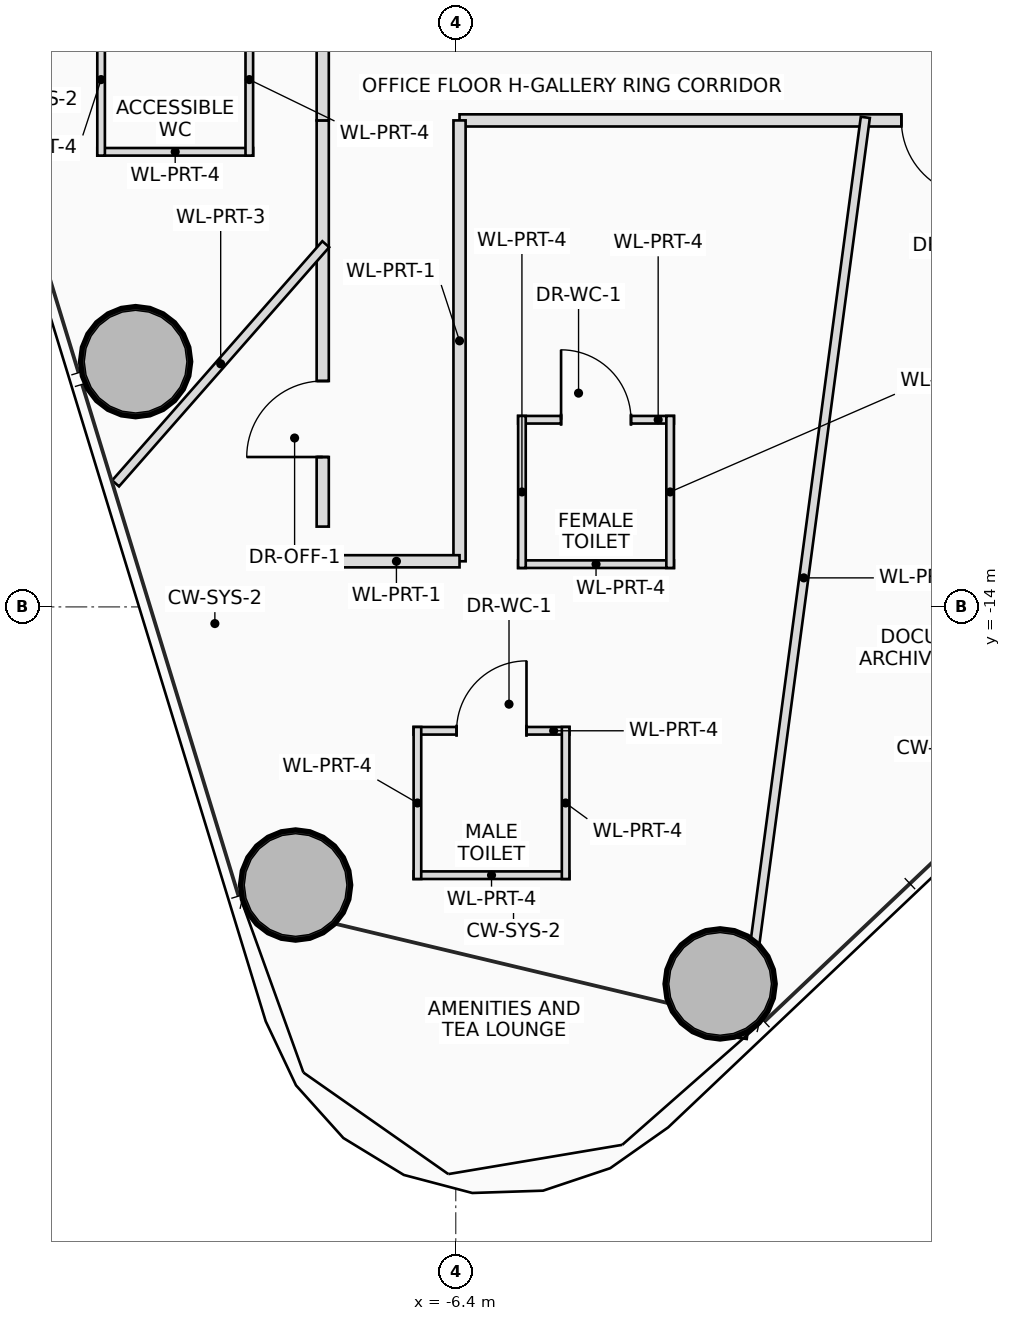
"""IFC4 building model, lengths in metres.
Left out: names, types, materials, properties, quantities, classifications, styles, units other than length and angle.
Written with IfcOpenShell. Run it as: python <this file> out.ifc"""

import sys

from ifc_helpers import new_model, si_unit, direction, frame, frame_2d, origin, origin_2d, place, context, subcontext, project, spatial, rectangle, hollow_circle, extrude, source, transform, mapped, element, fill, save


model = new_model("IFC4")
c1 = context("Model", 3, precision=1e-05, world=origin(), true_north=direction((0.0, 1.0)))
c2 = subcontext(c1, "Body", "Model", "MODEL_VIEW")
j1 = project(units=[si_unit("LENGTHUNIT", "METRE"), si_unit("PLANEANGLEUNIT", "RADIAN")], contexts=[c1])
p1 = place(None, origin())
s1 = spatial("IfcSite", under=j1, at=p1, CompositionType="ELEMENT")
p2 = place(p1, origin())
s2 = spatial("IfcBuilding", under=s1, at=p2, CompositionType="ELEMENT")
p3 = place(p2, frame((0.0, 0.0, 116.15)))
s3 = spatial("IfcBuildingStorey", under=s2, at=p3, CompositionType="ELEMENT", Elevation=116.15)
m1 = source(origin(), c2, "Body", "SweptSolid", [
    extrude(hollow_circle(Radius=0.725, WallThickness=0.05, at=origin_2d()), origin(), (0.0, 0.0, 1.0), 3.75),
])
for number, where, z_axis, x_axis in (
    (1, (-2.921, -18.96, 0.0), (0.0, 0.0, 1.0), (1.0, 0.0, 0.0)),
    (2, (-10.612, -10.774, 0.0), (0.0, 0.0, 1.0), (1.0, 0.0, 0.0)),
    (3, (-8.507, -17.659, 0.0), (0.0, 0.0, 1.0), (1.0, 0.0, 0.0)),
):
    element("IfcColumn", number, at=place(p3, frame(where, z_axis=z_axis, x_axis=x_axis)), inside=s3, PredefinedType="COLUMN", context=c2, shape_type="MappedRepresentation", body=[
        mapped(m1, transform((0.0, 0.0, 0.0), scale=1.0)),
    ])
p4 = place(p3, frame((-6.954, -15.63, 0.0), z_axis=(0.0, 0.0, 1.0), x_axis=(1.0, 0.0, 0.0)))
e4 = element("IfcWall", 4, at=p4, inside=s3, PredefinedType="PARTITIONING", context=c2, shape_type="SweptSolid", body=[
    extrude(rectangle(XDim=2.05, YDim=0.1, at=frame_2d((1.025, 0.0))), origin(), (0.0, 0.0, 1.0), 3.51),
])
p5 = place(p4, frame((0.565, 0.0, 0.0)))
e5 = element("IfcOpeningElement", 5, at=p5, cuts=e4, PredefinedType="OPENING", context=c2, shape_type="SweptSolid", body=[
    extrude(rectangle(XDim=0.92, YDim=2.1, at=frame_2d((0.46, 1.05))), frame((0.0, 0.06, 0.0), z_axis=(0.0, -1.0, 0.0), x_axis=(1.0, 0.0, 0.0)), (0.0, 0.0, 1.0), 0.12),
])
p6 = place(p3, frame((-4.904, -17.53, 0.0), z_axis=(0.0, 0.0, 1.0), x_axis=(-1.0, 0.0, 0.0)))
e6 = element("IfcWall", 6, at=p6, inside=s3, PredefinedType="PARTITIONING", context=c2, shape_type="SweptSolid", body=[
    extrude(rectangle(XDim=2.05, YDim=0.1, at=frame_2d((1.025, 0.0))), origin(), (0.0, 0.0, 1.0), 3.51),
])
for number, where, z_axis, x_axis in (
    (7, (-4.954, -15.58, 0.0), (0.0, 0.0, 1.0), (0.0, -1.0, 0.0)),
    (8, (-6.904, -17.58, 0.0), (0.0, 0.0, 1.0), (0.0, 1.0, 0.0)),
):
    element("IfcWall", number, at=place(p3, frame(where, z_axis=z_axis, x_axis=x_axis)), inside=s3, PredefinedType="PARTITIONING", context=c2, shape_type="SweptSolid", body=[
        extrude(rectangle(XDim=2.0, YDim=0.1, at=frame_2d((1.0, 0.0))), origin(), (0.0, 0.0, 1.0), 3.51),
    ])
p7 = place(p3, frame((-5.579, -11.538, 0.0), z_axis=(0.0, 0.0, 1.0), x_axis=(1.0, 0.0, 0.0)))
e9 = element("IfcWall", 9, at=p7, inside=s3, PredefinedType="PARTITIONING", context=c2, shape_type="SweptSolid", body=[
    extrude(rectangle(XDim=2.05, YDim=0.1, at=frame_2d((1.025, 0.0))), origin(), (0.0, 0.0, 1.0), 2.815),
])
p8 = place(p7, frame((0.565, 0.0, 0.0)))
e10 = element("IfcOpeningElement", 10, at=p8, cuts=e9, PredefinedType="OPENING", context=c2, shape_type="SweptSolid", body=[
    extrude(rectangle(XDim=0.92, YDim=2.1, at=frame_2d((0.46, 1.05))), frame((0.0, 0.06, 0.0), z_axis=(0.0, -1.0, 0.0), x_axis=(1.0, 0.0, 0.0)), (0.0, 0.0, 1.0), 0.12),
])
p9 = place(p3, frame((-3.529, -13.438, 0.0), z_axis=(0.0, 0.0, 1.0), x_axis=(-1.0, 0.0, 0.0)))
e11 = element("IfcWall", 11, at=p9, inside=s3, PredefinedType="PARTITIONING", context=c2, shape_type="SweptSolid", body=[
    extrude(rectangle(XDim=2.05, YDim=0.1, at=frame_2d((1.025, 0.0))), origin(), (0.0, 0.0, 1.0), 2.815),
])
for number, where, z_axis, x_axis in (
    (12, (-3.579, -11.488, 0.0), (0.0, 0.0, 1.0), (0.0, -1.0, 0.0)),
    (13, (-5.529, -13.488, 0.0), (0.0, 0.0, 1.0), (0.0, 1.0, 0.0)),
):
    element("IfcWall", number, at=place(p3, frame(where, z_axis=z_axis, x_axis=x_axis)), inside=s3, PredefinedType="PARTITIONING", context=c2, shape_type="SweptSolid", body=[
        extrude(rectangle(XDim=2.0, YDim=0.1, at=frame_2d((1.0, 0.0))), origin(), (0.0, 0.0, 1.0), 3.015),
    ])
p10 = place(p3, frame((-9.066, -8.013, 0.0), z_axis=(0.0, 0.0, 1.0), x_axis=(-1.0, 0.0, 0.0)))
e14 = element("IfcWall", 14, at=p10, inside=s3, PredefinedType="PARTITIONING", context=c2, shape_type="SweptSolid", body=[
    extrude(rectangle(XDim=2.05, YDim=0.1, at=frame_2d((1.025, 0.0))), origin(), (0.0, 0.0, 1.0), 3.165),
])
p11 = place(p3, frame((-9.116, -6.063, 0.0), z_axis=(0.0, 0.0, 1.0), x_axis=(0.0, -1.0, 0.0)))
e15 = element("IfcWall", 15, at=p11, inside=s3, PredefinedType="PARTITIONING", context=c2, shape_type="SweptSolid", body=[
    extrude(rectangle(XDim=2.0, YDim=0.1, at=frame_2d((1.0, 0.0))), origin(), (0.0, 0.0, 1.0), 3.015),
])
p12 = place(p3, frame((-11.066, -8.063, 0.0), z_axis=(0.0, 0.0, 1.0), x_axis=(0.0, 1.0, 0.0)))
e16 = element("IfcWall", 16, at=p12, inside=s3, PredefinedType="PARTITIONING", context=c2, shape_type="SweptSolid", body=[
    extrude(rectangle(XDim=2.0, YDim=0.1, at=frame_2d((1.0, 0.0))), origin(), (0.0, 0.0, 1.0), 3.51),
])
p13 = place(p3, frame((-8.15, -12.944, 0.0), z_axis=(0.0, 0.0, 1.0), x_axis=(0.0, 1.0, 0.0)))
e17 = element("IfcWall", 17, at=p13, inside=s3, PredefinedType="PARTITIONING", context=c2, shape_type="SweptSolid", body=[
    extrude(rectangle(XDim=5.344, YDim=0.16, at=frame_2d((2.672, 0.0))), origin(), (0.0, 0.0, 1.0), 2.815),
])
p14 = place(p13, frame((0.916, 0.0, 0.0)))
e18 = element("IfcOpeningElement", 18, at=p14, cuts=e17, PredefinedType="OPENING", context=c2, shape_type="SweptSolid", body=[
    extrude(rectangle(XDim=1.0, YDim=2.25, at=frame_2d((0.5, 1.125))), frame((0.0, 0.09, 0.0), z_axis=(0.0, -1.0, 0.0), x_axis=(1.0, 0.0, 0.0)), (0.0, 0.0, 1.0), 0.18),
])
p15 = place(p3, frame((-8.15, -7.6, 0.0), z_axis=(0.0, 0.0, 1.0), x_axis=(0.0, 1.0, 0.0)))
e19 = element("IfcWall", 19, at=p15, inside=s3, PredefinedType="PARTITIONING", context=c2, shape_type="SweptSolid", body=[
    extrude(rectangle(XDim=15.2, YDim=0.16, at=frame_2d((7.6, 0.0))), origin(), (0.0, 0.0, 1.0), 2.815),
])
p16 = place(p15, frame((2.29, 0.0, 0.0)))
e20 = element("IfcOpeningElement", 20, at=p16, cuts=e19, PredefinedType="OPENING", context=c2, shape_type="SweptSolid", body=[
    extrude(rectangle(XDim=1.0, YDim=2.25, at=frame_2d((0.5, 1.125))), frame((0.0, 0.09, 0.0), z_axis=(0.0, -1.0, 0.0), x_axis=(1.0, 0.0, 0.0)), (0.0, 0.0, 1.0), 0.18),
])
p17 = place(p15, frame((7.0, 0.0, 0.0)))
e21 = element("IfcOpeningElement", 21, at=p17, cuts=e19, PredefinedType="OPENING", context=c2, shape_type="SweptSolid", body=[
    extrude(rectangle(XDim=1.0, YDim=2.25, at=frame_2d((0.5, 1.125))), frame((0.0, 0.09, 0.0), z_axis=(0.0, -1.0, 0.0), x_axis=(1.0, 0.0, 0.0)), (0.0, 0.0, 1.0), 0.18),
])
p18 = place(p15, frame((10.325, 0.0, 0.0)))
e22 = element("IfcOpeningElement", 22, at=p18, cuts=e19, PredefinedType="OPENING", context=c2, shape_type="SweptSolid", body=[
    extrude(rectangle(XDim=1.0, YDim=2.25, at=frame_2d((0.5, 1.125))), frame((0.0, 0.09, 0.0), z_axis=(0.0, -1.0, 0.0), x_axis=(1.0, 0.0, 0.0)), (0.0, 0.0, 1.0), 0.18),
])
p19 = place(p15, frame((13.035, 0.0, 0.0)))
e23 = element("IfcOpeningElement", 23, at=p19, cuts=e19, PredefinedType="OPENING", context=c2, shape_type="SweptSolid", body=[
    extrude(rectangle(XDim=1.0, YDim=2.25, at=frame_2d((0.5, 1.125))), frame((0.0, 0.09, 0.0), z_axis=(0.0, -1.0, 0.0), x_axis=(1.0, 0.0, 0.0)), (0.0, 0.0, 1.0), 0.18),
])
p20 = place(p3, frame((6.35, -7.6, 0.0), z_axis=(0.0, 0.0, 1.0), x_axis=(-1.0, 0.0, 0.0)))
e24 = element("IfcWall", 24, at=p20, inside=s3, PredefinedType="PARTITIONING", context=c2, shape_type="SweptSolid", body=[
    extrude(rectangle(XDim=12.7, YDim=0.16, at=frame_2d((6.35, 0.0))), origin(), (0.0, 0.0, 1.0), 2.815),
])
p21 = place(p20, frame((5.887, 0.0, 0.0)))
e25 = element("IfcOpeningElement", 25, at=p21, cuts=e24, PredefinedType="OPENING", context=c2, shape_type="SweptSolid", body=[
    extrude(rectangle(XDim=1.0, YDim=2.25, at=frame_2d((0.5, 1.125))), frame((0.0, 0.09, 0.0), z_axis=(0.0, -1.0, 0.0), x_axis=(1.0, 0.0, 0.0)), (0.0, 0.0, 1.0), 0.18),
])
p22 = place(p3, frame((-6.35, -7.6, 0.0), z_axis=(0.0, 0.0, 1.0), x_axis=(0.0, -1.0, 0.0)))
e26 = element("IfcWall", 26, at=p22, inside=s3, PredefinedType="PARTITIONING", context=c2, shape_type="SweptSolid", body=[
    extrude(rectangle(XDim=5.8, YDim=0.16, at=frame_2d((2.9, 0.0))), origin(), (0.0, 0.0, 1.0), 2.815),
])
p23 = place(p3, frame((-6.35, -13.4, 0.0), z_axis=(0.0, 0.0, 1.0), x_axis=(-1.0, 0.0, 0.0)))
e27 = element("IfcWall", 27, at=p23, inside=s3, PredefinedType="PARTITIONING", context=c2, shape_type="SweptSolid", body=[
    extrude(rectangle(XDim=1.66, YDim=0.16, at=frame_2d((0.83, 0.0))), origin(), (0.0, 0.0, 1.0), 2.815),
])
p24 = place(p3, frame((-8.11, -9.229, 0.0), z_axis=(0.0, 0.0, 1.0), x_axis=(-0.66009168755, -0.751185039805, 0.0)))
e28 = element("IfcWall", 28, at=p24, inside=s3, PredefinedType="PARTITIONING", context=c2, shape_type="SweptSolid", body=[
    extrude(rectangle(XDim=4.189, YDim=0.12, at=frame_2d((2.094, 0.0))), origin(), (0.0, 0.0, 1.0), 2.975),
])
p25 = place(p3, frame((-1.011, -7.56, 0.0), z_axis=(0.0, 0.0, 1.0), x_axis=(-0.132529998166, -0.991178994726, 0.0)))
e29 = element("IfcWall", 29, at=p25, inside=s3, PredefinedType="PARTITIONING", context=c2, shape_type="SweptSolid", body=[
    extrude(rectangle(XDim=12.225, YDim=0.12, at=frame_2d((6.112, 0.0))), origin(), (0.0, 0.0, 1.0), 2.975),
])
p26 = place(p5, origin())
e30 = element("IfcDoor", 30, at=p26, inside=s3, OperationType="SINGLE_SWING_RIGHT", PredefinedType="DOOR", context=c2, shape_type="SweptSolid", body=[
    extrude(rectangle(XDim=0.92, YDim=2.1, at=frame_2d((0.46, 1.05))), frame((0.0, 0.025, 0.0), z_axis=(0.0, -1.0, 0.0), x_axis=(1.0, 0.0, 0.0)), (0.0, 0.0, 1.0), 0.05),
])
fill(e5, e30)
p27 = place(p8, origin())
e31 = element("IfcDoor", 31, at=p27, inside=s3, OperationType="SINGLE_SWING_LEFT", PredefinedType="DOOR", context=c2, shape_type="SweptSolid", body=[
    extrude(rectangle(XDim=0.92, YDim=2.1, at=frame_2d((0.46, 1.05))), frame((0.0, 0.025, 0.0), z_axis=(0.0, -1.0, 0.0), x_axis=(1.0, 0.0, 0.0)), (0.0, 0.0, 1.0), 0.05),
])
fill(e10, e31)
p28 = place(p14, origin())
e32 = element("IfcDoor", 32, at=p28, inside=s3, OperationType="SINGLE_SWING_LEFT", PredefinedType="DOOR", context=c2, shape_type="SweptSolid", body=[
    extrude(rectangle(XDim=1.0, YDim=2.25, at=frame_2d((0.5, 1.125))), frame((0.0, 0.025, 0.0), z_axis=(0.0, -1.0, 0.0), x_axis=(1.0, 0.0, 0.0)), (0.0, 0.0, 1.0), 0.05),
])
fill(e18, e32)
p29 = place(p21, origin())
e33 = element("IfcDoor", 33, at=p29, inside=s3, OperationType="SINGLE_SWING_LEFT", PredefinedType="DOOR", context=c2, shape_type="SweptSolid", body=[
    extrude(rectangle(XDim=1.0, YDim=2.25, at=frame_2d((0.5, 1.125))), frame((0.0, 0.025, 0.0), z_axis=(0.0, -1.0, 0.0), x_axis=(1.0, 0.0, 0.0)), (0.0, 0.0, 1.0), 0.05),
])
fill(e25, e33)
save(model, sys.argv[1])
